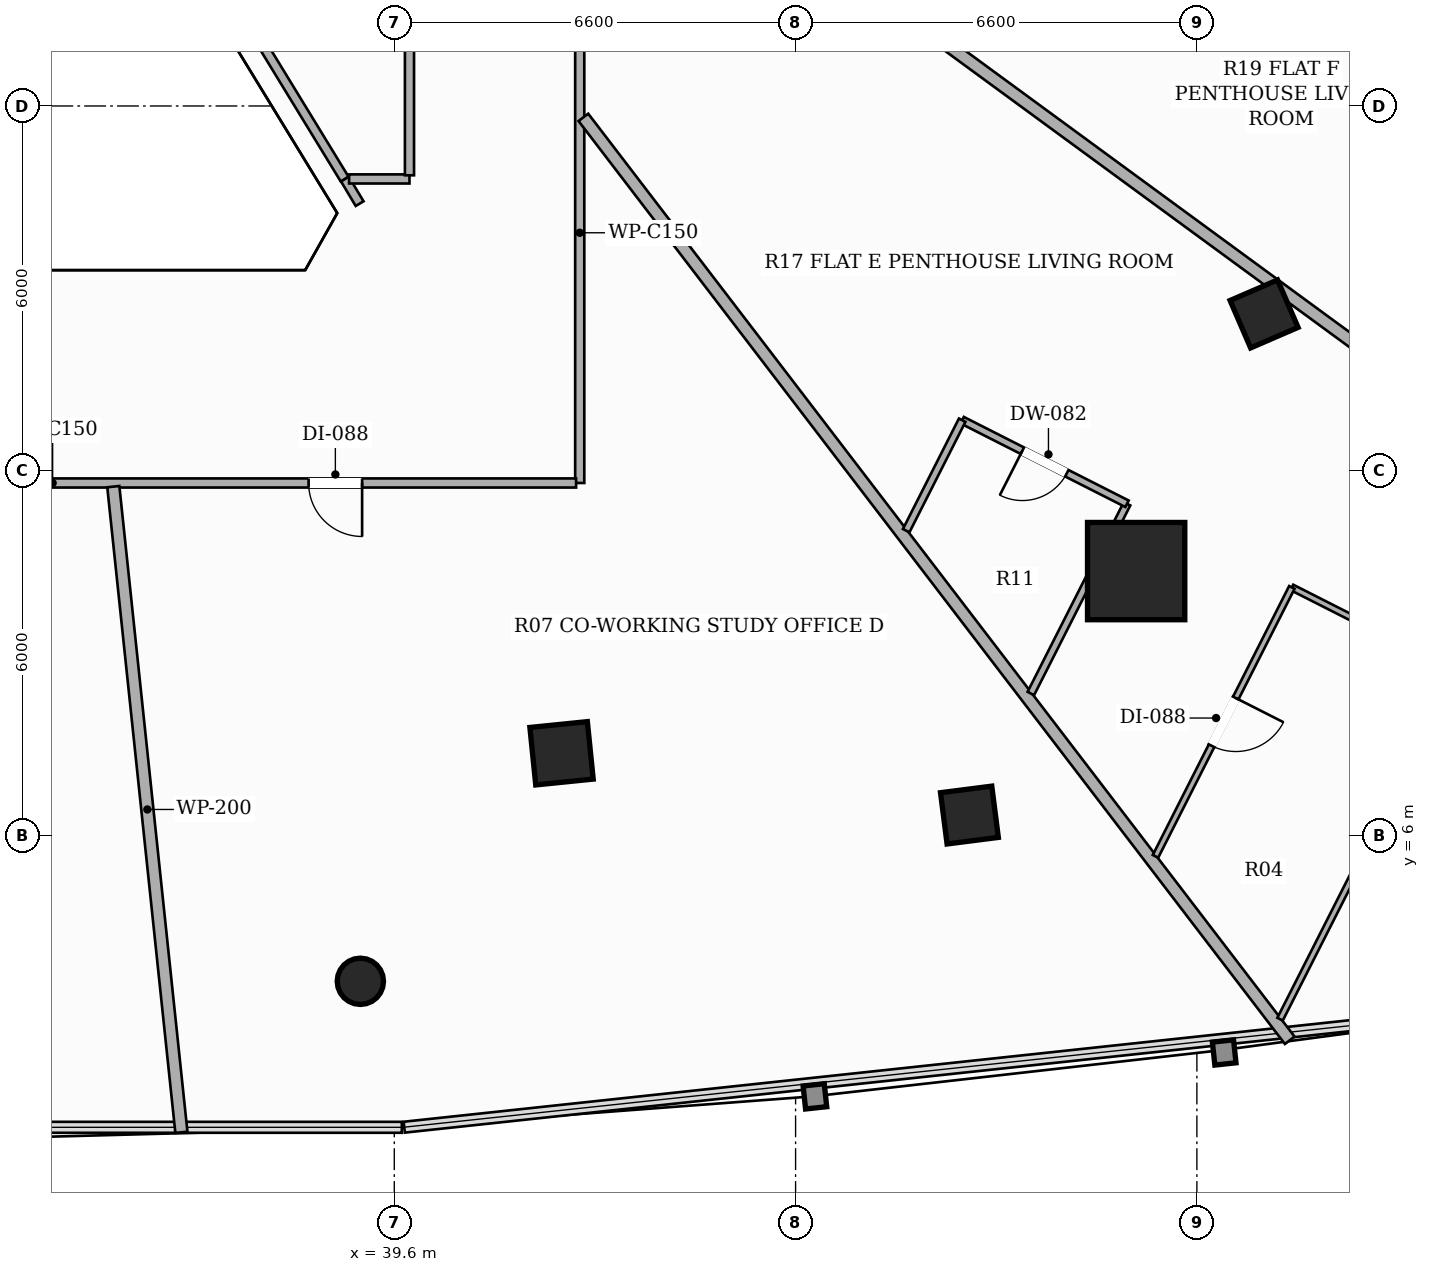
"""IFC4 building model, lengths in metres.
Left out: names, types, materials, properties, quantities, classifications, styles, units other than length and angle.
Written with IfcOpenShell. Run it as: python <this file> out.ifc"""

import sys

from ifc_helpers import new_model, si_unit, direction, frame, frame_2d, origin, origin_2d, place, context, subcontext, project, spatial, rectangle, hollow_rectangle, hollow_circle, extrude, element, fill, save


model = new_model("IFC4")
c1 = context("Model", 3, precision=1e-05, world=origin(), true_north=direction((0.0, 1.0)))
c2 = subcontext(c1, "Body", "Model", "MODEL_VIEW")
j1 = project(units=[si_unit("LENGTHUNIT", "METRE"), si_unit("PLANEANGLEUNIT", "RADIAN")], contexts=[c1])
p1 = place(None, origin())
s1 = spatial("IfcSite", under=j1, at=p1, CompositionType="ELEMENT")
p2 = place(p1, origin())
s2 = spatial("IfcBuilding", under=s1, at=p2, CompositionType="ELEMENT")
p3 = place(p2, frame((0.0, 0.0, 26.9)))
s3 = spatial("IfcBuildingStorey", under=s2, at=p3, CompositionType="ELEMENT", Elevation=26.9)
p4 = place(p3, frame((51.801, 10.351, 0.0), z_axis=(0.0, 0.0, 1.0), x_axis=(1.0, 0.0, 0.0)))
e1 = element("IfcColumn", 1, at=p4, inside=s3, PredefinedType="COLUMN", context=c2, shape_type="SweptSolid", body=[
    extrude(hollow_rectangle(XDim=1.6, YDim=1.6, WallThickness=0.05, at=origin_2d()), origin(), (0.0, 0.0, 1.0), 3.3),
])
p5 = place(p3, frame((42.351, 7.355, 0.0), z_axis=(0.0, 0.0, 1.0), x_axis=(0.994880708829, 0.101056297183, 0.0)))
e2 = element("IfcColumn", 2, at=p5, inside=s3, PredefinedType="COLUMN", context=c2, shape_type="SweptSolid", body=[
    extrude(hollow_rectangle(XDim=0.95, YDim=0.95, WallThickness=0.032, at=origin_2d()), origin(), (0.0, 0.0, 1.0), 3.3),
])
for number, where, z_axis, x_axis in (
    (3, (49.059, 6.339, 0.0), (0.0, 0.0, 1.0), (0.992, 0.127, 0.0)),
    (4, (53.905, 14.58, 0.0), (0.0, 0.0, 1.0), (-0.397, 0.918, 0.0)),
):
    element("IfcColumn", number, at=place(p3, frame(where, z_axis=z_axis, x_axis=x_axis)), inside=s3, PredefinedType="COLUMN", context=c2, shape_type="SweptSolid", body=[
        extrude(hollow_rectangle(XDim=0.85, YDim=0.85, WallThickness=0.028, at=origin_2d()), origin(), (0.0, 0.0, 1.0), 3.3),
    ])
p6 = place(p3, frame((39.042, 3.605, 0.0), z_axis=(0.0, 0.0, 1.0), x_axis=(1.0, 0.0, 0.0)))
e5 = element("IfcColumn", 5, at=p6, inside=s3, PredefinedType="COLUMN", context=c2, shape_type="SweptSolid", body=[
    extrude(hollow_circle(Radius=0.381, WallThickness=0.022, at=origin_2d()), origin(), (0.0, 0.0, 1.0), 3.3),
])
p7 = place(p3, frame((42.65, 36.84, 0.0), z_axis=(0.0, 0.0, 1.0), x_axis=(0.0, -1.0, 0.0)))
e6 = element("IfcWall", 6, at=p7, inside=s3, PredefinedType="PARTITIONING", context=c2, shape_type="SweptSolid", body=[
    extrude(rectangle(XDim=25.04, YDim=0.15, at=frame_2d((12.52, 0.0))), origin(), (0.0, 0.0, 1.0), 2.413),
])
p8 = place(p7, frame((2.543, 0.0, 0.0)))
e7 = element("IfcOpeningElement", 7, at=p8, cuts=e6, PredefinedType="OPENING", context=c2, shape_type="SweptSolid", body=[
    extrude(rectangle(XDim=0.88, YDim=2.1, at=frame_2d((0.44, 1.05))), frame((0.0, 0.085, 0.0), z_axis=(0.0, -1.0, 0.0), x_axis=(1.0, 0.0, 0.0)), (0.0, 0.0, 1.0), 0.17),
])
p9 = place(p7, frame((15.79, 0.0, 0.0)))
e8 = element("IfcOpeningElement", 8, at=p9, cuts=e6, PredefinedType="OPENING", context=c2, shape_type="SweptSolid", body=[
    extrude(rectangle(XDim=0.92, YDim=2.15, at=frame_2d((0.46, 1.075))), frame((0.0, 0.085, 0.0), z_axis=(0.0, -1.0, 0.0), x_axis=(1.0, 0.0, 0.0)), (0.0, 0.0, 1.0), 0.17),
])
p10 = place(p7, frame((9.103, 0.0, 0.0)))
e9 = element("IfcOpeningElement", 9, at=p10, cuts=e6, PredefinedType="OPENING", context=c2, shape_type="SweptSolid", body=[
    extrude(rectangle(XDim=0.92, YDim=2.15, at=frame_2d((0.46, 1.075))), frame((0.0, 0.085, 0.0), z_axis=(0.0, -1.0, 0.0), x_axis=(1.0, 0.0, 0.0)), (0.0, 0.0, 1.0), 0.17),
])
p11 = place(p3, frame((42.59, 11.8, 0.0), z_axis=(0.0, 0.0, 1.0), x_axis=(-1.0, 0.0, 0.0)))
e10 = element("IfcWall", 10, at=p11, inside=s3, PredefinedType="PARTITIONING", context=c2, shape_type="SweptSolid", body=[
    extrude(rectangle(XDim=19.24, YDim=0.15, at=frame_2d((9.62, 0.0))), origin(), (0.0, 0.0, 1.0), 2.669),
])
p12 = place(p11, frame((12.818, 0.0, 0.0)))
e11 = element("IfcOpeningElement", 11, at=p12, cuts=e10, PredefinedType="OPENING", context=c2, shape_type="SweptSolid", body=[
    extrude(rectangle(XDim=0.92, YDim=2.15, at=frame_2d((0.46, 1.075))), frame((0.0, 0.085, 0.0), z_axis=(0.0, -1.0, 0.0), x_axis=(1.0, 0.0, 0.0)), (0.0, 0.0, 1.0), 0.17),
])
p13 = place(p11, frame((3.519, 0.0, 0.0)))
e12 = element("IfcOpeningElement", 12, at=p13, cuts=e10, PredefinedType="OPENING", context=c2, shape_type="SweptSolid", body=[
    extrude(rectangle(XDim=0.88, YDim=2.1, at=frame_2d((0.44, 1.05))), frame((0.0, 0.085, 0.0), z_axis=(0.0, -1.0, 0.0), x_axis=(1.0, 0.0, 0.0)), (0.0, 0.0, 1.0), 0.17),
])
p14 = place(p3, frame((39.03, 16.394, 0.0), z_axis=(0.0, 0.0, 1.0), x_axis=(-0.51343298076, 0.858129695482, 0.0)))
e13 = element("IfcWall", 13, at=p14, inside=s3, PredefinedType="PARTITIONING", context=c2, shape_type="SweptSolid", body=[
    extrude(rectangle(XDim=0.473, YDim=0.15, at=frame_2d((0.237, 0.0))), origin(), (0.0, 0.0, 1.0), 3.06),
])
p15 = place(p3, frame((38.857, 16.8, 0.0), z_axis=(0.0, 0.0, 1.0), x_axis=(1.0, 0.0, 0.0)))
e14 = element("IfcWall", 14, at=p15, inside=s3, PredefinedType="PARTITIONING", context=c2, shape_type="SweptSolid", body=[
    extrude(rectangle(XDim=0.993, YDim=0.15, at=frame_2d((0.497, 0.0))), origin(), (0.0, 0.0, 1.0), 3.06),
])
p16 = place(p3, frame((39.85, 16.86, 0.0), z_axis=(0.0, 0.0, 1.0), x_axis=(0.0, 1.0, 0.0)))
e15 = element("IfcWall", 15, at=p16, inside=s3, PredefinedType="PARTITIONING", context=c2, shape_type="SweptSolid", body=[
    extrude(rectangle(XDim=6.99, YDim=0.15, at=frame_2d((3.495, 0.0))), origin(), (0.0, 0.0, 1.0), 2.669),
])
p17 = place(p16, frame((3.055, 0.0, 0.0)))
e16 = element("IfcOpeningElement", 16, at=p17, cuts=e15, PredefinedType="OPENING", context=c2, shape_type="SweptSolid", body=[
    extrude(rectangle(XDim=0.88, YDim=2.1, at=frame_2d((0.44, 1.05))), frame((0.0, 0.085, 0.0), z_axis=(0.0, -1.0, 0.0), x_axis=(1.0, 0.0, 0.0)), (0.0, 0.0, 1.0), 0.17),
])
p18 = place(p3, frame((34.508, 23.79, 0.0), z_axis=(0.0, 0.0, 1.0), x_axis=(0.52163195406, -0.853170618636, 0.0)))
e17 = element("IfcWall", 17, at=p18, inside=s3, PredefinedType="PARTITIONING", context=c2, shape_type="SweptSolid", body=[
    extrude(rectangle(XDim=8.195, YDim=0.15, at=frame_2d((4.098, 0.0))), origin(), (0.0, 0.0, 1.0), 2.669),
])
p19 = place(p3, frame((34.979, 11.74, 0.0), z_axis=(0.0, 0.0, 1.0), x_axis=(0.104910939681, -0.994481621115, 0.0)))
e18 = element("IfcWall", 18, at=p19, inside=s3, PredefinedType="PARTITIONING", context=c2, shape_type="SweptSolid", body=[
    extrude(rectangle(XDim=10.677, YDim=0.2, at=frame_2d((5.338, 0.0))), origin(), (0.0, 0.0, 1.0), 2.413),
])
p20 = place(p3, frame((42.71, 17.813, 0.0), z_axis=(0.0, 0.0, 1.0), x_axis=(0.607788570878, -0.794098893784, 0.0)))
e19 = element("IfcWall", 19, at=p20, inside=s3, PredefinedType="PARTITIONING", context=c2, shape_type="SweptSolid", body=[
    extrude(rectangle(XDim=19.114, YDim=0.2, at=frame_2d((9.557, 0.0))), origin(), (0.0, 0.0, 1.0), 2.413),
])
p21 = place(p3, frame((42.71, 23.387, 0.0), z_axis=(0.0, 0.0, 1.0), x_axis=(0.806713303584, -0.590943014021, 0.0)))
e20 = element("IfcWall", 20, at=p21, inside=s3, PredefinedType="PARTITIONING", context=c2, shape_type="SweptSolid", body=[
    extrude(rectangle(XDim=22.171, YDim=0.2, at=frame_2d((11.086, 0.0))), origin(), (0.0, 0.0, 1.0), 2.413),
])
p22 = place(p3, frame((50.069, 8.338, 0.0), z_axis=(0.0, 0.0, 1.0), x_axis=(0.45217581214, 0.891928828391, 0.0)))
e21 = element("IfcWall", 21, at=p22, inside=s3, PredefinedType="PARTITIONING", context=c2, shape_type="SweptSolid", body=[
    extrude(rectangle(XDim=3.498, YDim=0.12, at=frame_2d((1.749, 0.0))), origin(), (0.0, 0.0, 1.0), 2.413),
])
p23 = place(p3, frame((51.651, 11.458, 0.0), z_axis=(0.0, 0.0, 1.0), x_axis=(-0.891842269509, 0.452346511336, 0.0)))
e22 = element("IfcWall", 22, at=p23, inside=s3, PredefinedType="PARTITIONING", context=c2, shape_type="SweptSolid", body=[
    extrude(rectangle(XDim=3.04, YDim=0.12, at=frame_2d((1.52, 0.0))), origin(), (0.0, 0.0, 1.0), 2.413),
])
p24 = place(p23, frame((1.11, 0.0, 0.0)))
e23 = element("IfcOpeningElement", 23, at=p24, cuts=e22, PredefinedType="OPENING", context=c2, shape_type="SweptSolid", body=[
    extrude(rectangle(XDim=0.82, YDim=2.1, at=frame_2d((0.41, 1.05))), frame((0.0, 0.07, 0.0), z_axis=(0.0, -1.0, 0.0), x_axis=(1.0, 0.0, 0.0)), (0.0, 0.0, 1.0), 0.14),
])
p25 = place(p3, frame((48.94, 12.833, 0.0), z_axis=(0.0, 0.0, 1.0), x_axis=(-0.452097038501, -0.891968759418, 0.0)))
e24 = element("IfcWall", 24, at=p25, inside=s3, PredefinedType="PARTITIONING", context=c2, shape_type="SweptSolid", body=[
    extrude(rectangle(XDim=2.037, YDim=0.12, at=frame_2d((1.019, 0.0))), origin(), (0.0, 0.0, 1.0), 3.06),
])
p26 = place(p3, frame((57.073, 8.708, 0.0), z_axis=(0.0, 0.0, 1.0), x_axis=(-0.891842269509, 0.452346511336, 0.0)))
e25 = element("IfcWall", 25, at=p26, inside=s3, PredefinedType="PARTITIONING", context=c2, shape_type="SweptSolid", body=[
    extrude(rectangle(XDim=3.04, YDim=0.1, at=frame_2d((1.52, 0.0))), origin(), (0.0, 0.0, 1.0), 2.619),
])
p27 = place(p3, frame((54.362, 10.083, 0.0), z_axis=(0.0, 0.0, 1.0), x_axis=(-0.452306340277, -0.891862643317, 0.0)))
e26 = element("IfcWall", 26, at=p27, inside=s3, PredefinedType="PARTITIONING", context=c2, shape_type="SweptSolid", body=[
    extrude(rectangle(XDim=4.959, YDim=0.1, at=frame_2d((2.48, 0.0))), origin(), (0.0, 0.0, 1.0), 3.06),
])
p28 = place(p27, frame((2.04, 0.0, 0.0)))
e27 = element("IfcOpeningElement", 27, at=p28, cuts=e26, PredefinedType="OPENING", context=c2, shape_type="SweptSolid", body=[
    extrude(rectangle(XDim=0.88, YDim=2.1, at=frame_2d((0.44, 1.05))), frame((0.0, 0.06, 0.0), z_axis=(0.0, -1.0, 0.0), x_axis=(1.0, 0.0, 0.0)), (0.0, 0.0, 1.0), 0.12),
])
p29 = place(p3, frame((54.168, 2.982, 0.0), z_axis=(0.0, 0.0, 1.0), x_axis=(0.452437935158, 0.891795893033, 0.0)))
e28 = element("IfcWall", 28, at=p29, inside=s3, PredefinedType="PARTITIONING", context=c2, shape_type="SweptSolid", body=[
    extrude(rectangle(XDim=6.421, YDim=0.1, at=frame_2d((3.21, 0.0))), origin(), (0.0, 0.0, 1.0), 2.619),
])
p30 = place(p13, origin())
e29 = element("IfcDoor", 29, at=p30, inside=s3, OperationType="SINGLE_SWING_LEFT", PredefinedType="DOOR", context=c2, shape_type="SweptSolid", body=[
    extrude(rectangle(XDim=0.88, YDim=2.1, at=frame_2d((0.44, 1.05))), frame((0.0, 0.025, 0.0), z_axis=(0.0, -1.0, 0.0), x_axis=(1.0, 0.0, 0.0)), (0.0, 0.0, 1.0), 0.05),
])
fill(e12, e29)
p31 = place(p24, origin())
e30 = element("IfcDoor", 30, at=p31, inside=s3, OperationType="SINGLE_SWING_RIGHT", PredefinedType="DOOR", context=c2, shape_type="SweptSolid", body=[
    extrude(rectangle(XDim=0.82, YDim=2.1, at=frame_2d((0.41, 1.05))), frame((0.0, 0.025, 0.0), z_axis=(0.0, -1.0, 0.0), x_axis=(1.0, 0.0, 0.0)), (0.0, 0.0, 1.0), 0.05),
])
fill(e23, e30)
p32 = place(p28, origin())
e31 = element("IfcDoor", 31, at=p32, inside=s3, OperationType="SINGLE_SWING_LEFT", PredefinedType="DOOR", context=c2, shape_type="SweptSolid", body=[
    extrude(rectangle(XDim=0.88, YDim=2.1, at=frame_2d((0.44, 1.05))), frame((0.0, 0.025, 0.0), z_axis=(0.0, -1.0, 0.0), x_axis=(1.0, 0.0, 0.0)), (0.0, 0.0, 1.0), 0.05),
])
fill(e27, e31)
save(model, sys.argv[1])
